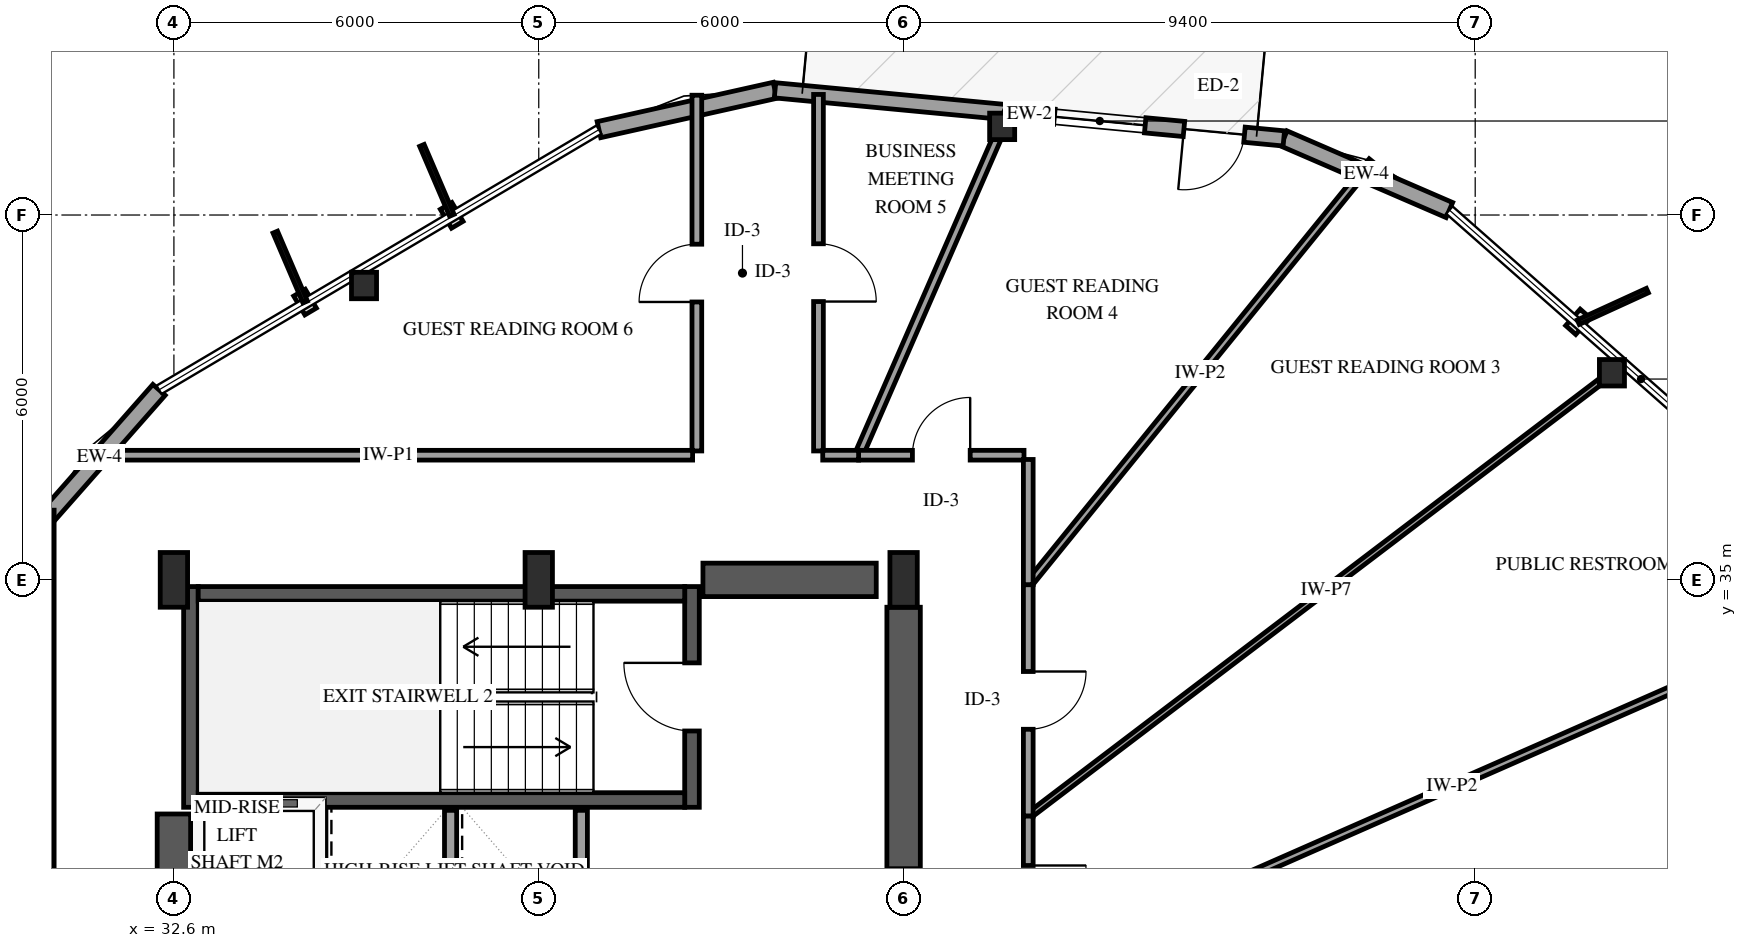
"""IFC4 building model, lengths in metres.
Left out: names, types, materials, properties, quantities, classifications, styles, units other than length and angle.
Written with IfcOpenShell. Run it as: python <this file> out.ifc"""

import sys

from ifc_helpers import new_model, si_unit, direction, frame, frame_2d, origin, origin_2d, place, context, subcontext, project, spatial, rectangle, i_section, extrude, element, fill, save


model = new_model("IFC4")
c1 = context("Model", 3, precision=1e-05, world=origin(), true_north=direction((0.0, 1.0)))
c2 = subcontext(c1, "Body", "Model", "MODEL_VIEW")
j1 = project(units=[si_unit("LENGTHUNIT", "METRE"), si_unit("PLANEANGLEUNIT", "RADIAN")], contexts=[c1])
p1 = place(None, origin())
s1 = spatial("IfcSite", under=j1, at=p1, CompositionType="ELEMENT")
p2 = place(p1, origin())
s2 = spatial("IfcBuilding", under=s1, at=p2, CompositionType="ELEMENT")
p3 = place(p2, frame((0.0, 0.0, 146.2)))
s3 = spatial("IfcBuildingStorey", under=s2, at=p3, CompositionType="ELEMENT", Elevation=146.2)
p4 = place(p3, frame((32.88, 31.26, 0.0), z_axis=(0.0, 0.0, 1.0), x_axis=(0.0, 1.0, 0.0)))
e1 = element("IfcWall", 1, at=p4, inside=s3, PredefinedType="SHEAR", context=c2, shape_type="SweptSolid", body=[
    extrude(rectangle(XDim=3.63, YDim=0.24, at=frame_2d((1.815, 0.0))), origin(), (0.0, 0.0, 1.0), 3.6),
])
p5 = place(p3, frame((41.12, 31.26, 0.0), z_axis=(0.0, 0.0, 1.0), x_axis=(0.0, 1.0, 0.0)))
e2 = element("IfcWall", 2, at=p5, inside=s3, PredefinedType="SHEAR", context=c2, shape_type="SweptSolid", body=[
    extrude(rectangle(XDim=3.63, YDim=0.24, at=frame_2d((1.815, 0.0))), origin(), (0.0, 0.0, 1.0), 3.6),
])
p6 = place(p5, frame((1.255, 0.0, 0.0)))
e3 = element("IfcOpeningElement", 3, at=p6, cuts=e2, PredefinedType="OPENING", context=c2, shape_type="SweptSolid", body=[
    extrude(rectangle(XDim=1.12, YDim=2.15, at=frame_2d((0.56, 1.075))), frame((0.0, 0.13, 0.0), z_axis=(0.0, -1.0, 0.0), x_axis=(1.0, 0.0, 0.0)), (0.0, 0.0, 1.0), 0.26),
])
for number, where, z_axis, x_axis in (
    (4, (33.0, 31.38, 0.0), (0.0, 0.0, 1.0), (1.0, 0.0, 0.0)),
    (5, (33.0, 34.77, 0.0), (0.0, 0.0, 1.0), (1.0, 0.0, 0.0)),
):
    element("IfcWall", number, at=place(p3, frame(where, z_axis=z_axis, x_axis=x_axis)), inside=s3, PredefinedType="SHEAR", context=c2, shape_type="SweptSolid", body=[
        extrude(rectangle(XDim=8.0, YDim=0.24, at=frame_2d((4.0, 0.0))), origin(), (0.0, 0.0, 1.0), 3.6),
    ])
p7 = place(p3, frame((32.6, 18.85, 0.0), z_axis=(0.0, 0.0, 1.0), x_axis=(0.0, 1.0, 0.0)))
e6 = element("IfcWall", 6, at=p7, inside=s3, PredefinedType="SHEAR", context=c2, shape_type="SweptSolid", body=[
    extrude(rectangle(XDim=12.3, YDim=0.55, at=frame_2d((6.15, 0.0))), origin(), (0.0, 0.0, 1.0), 3.6),
])
p8 = place(p3, frame((41.3, 35.0, 0.0), z_axis=(0.0, 0.0, 1.0), x_axis=(1.0, 0.0, 0.0)))
e7 = element("IfcWall", 7, at=p8, inside=s3, PredefinedType="SHEAR", context=c2, shape_type="SweptSolid", body=[
    extrude(rectangle(XDim=2.85, YDim=0.55, at=frame_2d((1.425, 0.0))), origin(), (0.0, 0.0, 1.0), 3.6),
])
p9 = place(p3, frame((44.6, 29.8, 0.0), z_axis=(0.0, 0.0, 1.0), x_axis=(0.0, 1.0, 0.0)))
e8 = element("IfcWall", 8, at=p9, inside=s3, PredefinedType="SHEAR", context=c2, shape_type="SweptSolid", body=[
    extrude(rectangle(XDim=4.75, YDim=0.55, at=frame_2d((2.375, 0.0))), origin(), (0.0, 0.0, 1.0), 3.6),
])
for number, where, z_axis, x_axis in (
    (9, (32.6, 35.0, 0.0), (0.0, 0.0, 1.0), (1.0, 0.0, 0.0)),
    (10, (38.6, 35.0, 0.0), (0.0, 0.0, 1.0), (1.0, 0.0, 0.0)),
    (11, (44.6, 35.0, 0.0), (0.0, 0.0, 1.0), (1.0, 0.0, 0.0)),
):
    element("IfcColumn", number, at=place(p3, frame(where, z_axis=z_axis, x_axis=x_axis)), inside=s3, PredefinedType="PILASTER", context=c2, shape_type="SweptSolid", body=[
        extrude(rectangle(XDim=0.45, YDim=0.9, at=origin_2d()), origin(), (0.0, 0.0, 1.0), 3.6),
    ])
for number, where, z_axis, x_axis in (
    (12, (56.249, 38.406, 0.0), (0.0, 0.0, 1.0), (1.0, 0.0, 0.0)),
    (13, (46.221, 42.458, 0.0), (0.0, 0.0, 1.0), (1.0, 0.0, 0.0)),
    (14, (35.726, 39.841, 0.0), (0.0, 0.0, 1.0), (1.0, 0.0, 0.0)),
):
    element("IfcColumn", number, at=place(p3, frame(where, z_axis=z_axis, x_axis=x_axis)), inside=s3, PredefinedType="COLUMN", context=c2, shape_type="SweptSolid", body=[
        extrude(i_section(OverallWidth=0.412, OverallDepth=0.435, WebThickness=0.036, FlangeThickness=0.057, FilletRadius=0.038, at=origin_2d()), origin(), (0.0, 0.0, 1.0), 3.6),
    ])
p10 = place(p3, frame((53.575, 41.082, 0.0), z_axis=(0.0, 0.0, 1.0), x_axis=(-0.917738684301, 0.397184726969, 0.0)))
e15 = element("IfcWall", 15, at=p10, inside=s3, PredefinedType="SOLIDWALL", context=c2, shape_type="SweptSolid", body=[
    extrude(rectangle(XDim=2.967, YDim=0.27, at=frame_2d((1.483, 0.0))), origin(), (0.0, 0.0, 1.0), 2.679),
])
p11 = place(p3, frame((42.485, 43.051, 0.0), z_axis=(0.0, 0.0, 1.0), x_axis=(-0.975913267769, -0.218158872827, 0.0)))
e16 = element("IfcWall", 16, at=p11, inside=s3, PredefinedType="SOLIDWALL", context=c2, shape_type="SweptSolid", body=[
    extrude(rectangle(XDim=2.967, YDim=0.27, at=frame_2d((1.483, 0.0))), origin(), (0.0, 0.0, 1.0), 2.679),
])
p12 = place(p3, frame((50.853, 42.26, 0.0), z_axis=(0.0, 0.0, 1.0), x_axis=(-0.995561547902, 0.094112721457, 0.0)))
e17 = element("IfcWall", 17, at=p12, inside=s3, PredefinedType="SOLIDWALL", context=c2, shape_type="SweptSolid", body=[
    extrude(rectangle(XDim=8.405, YDim=0.25, at=frame_2d((4.203, 0.0))), origin(), (0.0, 0.0, 1.0), 2.679),
])
p13 = place(p12, frame((0.65, 0.0, 0.0)))
e18 = element("IfcOpeningElement", 18, at=p13, cuts=e17, PredefinedType="OPENING", context=c2, shape_type="SweptSolid", body=[
    extrude(rectangle(XDim=1.0, YDim=2.15, at=frame_2d((0.5, 1.075))), frame((0.0, 0.135, 0.0), z_axis=(0.0, -1.0, 0.0), x_axis=(1.0, 0.0, 0.0)), (0.0, 0.0, 1.0), 0.27),
])
p14 = place(p12, frame((2.29, 0.0, 0.72)))
e19 = element("IfcOpeningElement", 19, at=p14, cuts=e17, PredefinedType="OPENING", context=c2, shape_type="SweptSolid", body=[
    extrude(rectangle(XDim=1.5, YDim=1.7, at=frame_2d((0.75, 0.85))), frame((0.0, 0.135, 0.0), z_axis=(0.0, -1.0, 0.0), x_axis=(1.0, 0.0, 0.0)), (0.0, 0.0, 1.0), 0.27),
])
p15 = place(p3, frame((32.355, 38.125, 0.0), z_axis=(0.0, 0.0, 1.0), x_axis=(-0.661354843955, -0.750073176681, 0.0)))
e20 = element("IfcWall", 20, at=p15, inside=s3, PredefinedType="SOLIDWALL", context=c2, shape_type="SweptSolid", body=[
    extrude(rectangle(XDim=2.967, YDim=0.27, at=frame_2d((1.483, 0.0))), origin(), (0.0, 0.0, 1.0), 2.679),
])
for number, where, z_axis, x_axis in (
    (21, (35.0, 29.11, 0.0), (0.0, 0.0, 1.0), (0.0, 1.0, 0.0)),
    (22, (37.15, 29.11, 0.0), (0.0, 0.0, 1.0), (0.0, 1.0, 0.0)),
    (23, (39.3, 29.11, 0.0), (0.0, 0.0, 1.0), (0.0, 1.0, 0.0)),
):
    element("IfcWall", number, at=place(p3, frame(where, z_axis=z_axis, x_axis=x_axis)), inside=s3, PredefinedType="SOLIDWALL", context=c2, shape_type="SweptSolid", body=[
        extrude(rectangle(XDim=2.1, YDim=0.2, at=frame_2d((1.05, 0.0))), origin(), (0.0, 0.0, 1.0), 3.3),
    ])
p16 = place(p3, frame((46.65, 28.541, 0.0), z_axis=(0.0, 0.0, 1.0), x_axis=(0.915386429194, 0.402576309844, 0.0)))
e24 = element("IfcWall", 24, at=p16, inside=s3, PredefinedType="PARTITIONING", context=c2, shape_type="SweptSolid", body=[
    extrude(rectangle(XDim=15.224, YDim=0.12, at=frame_2d((7.612, 0.0))), origin(), (0.0, 0.0, 1.0), 3.3),
])
p17 = place(p3, frame((30.55, 21.778, 0.0), z_axis=(0.0, 0.0, 1.0), x_axis=(0.0, 1.0, 0.0)))
e25 = element("IfcWall", 25, at=p17, inside=s3, PredefinedType="PARTITIONING", context=c2, shape_type="SweptSolid", body=[
    extrude(rectangle(XDim=14.368, YDim=0.16, at=frame_2d((7.184, 0.0))), origin(), (0.0, 0.0, 1.0), 3.3),
])
p18 = place(p17, frame((6.709, 0.0, 0.0)))
e26 = element("IfcOpeningElement", 26, at=p18, cuts=e25, PredefinedType="OPENING", context=c2, shape_type="SweptSolid", body=[
    extrude(rectangle(XDim=0.95, YDim=2.15, at=frame_2d((0.475, 1.075))), frame((0.0, 0.09, 0.0), z_axis=(0.0, -1.0, 0.0), x_axis=(1.0, 0.0, 0.0)), (0.0, 0.0, 1.0), 0.18),
])
p19 = place(p3, frame((46.65, 31.115, 0.0), z_axis=(0.0, 0.0, 1.0), x_axis=(0.796314037098, 0.604883422092, 0.0)))
e27 = element("IfcWall", 27, at=p19, inside=s3, PredefinedType="PARTITIONING", context=c2, shape_type="SweptSolid", body=[
    extrude(rectangle(XDim=12.298, YDim=0.1, at=frame_2d((6.149, 0.0))), origin(), (0.0, 0.0, 1.0), 3.3),
])
p20 = place(p3, frame((46.65, 34.921, 0.0), z_axis=(0.0, 0.0, 1.0), x_axis=(0.630132507275, 0.776487619524, 0.0)))
e28 = element("IfcWall", 28, at=p20, inside=s3, PredefinedType="PARTITIONING", context=c2, shape_type="SweptSolid", body=[
    extrude(rectangle(XDim=8.971, YDim=0.12, at=frame_2d((4.486, 0.0))), origin(), (0.0, 0.0, 1.0), 2.678),
])
p21 = place(p3, frame((43.86, 37.05, 0.0), z_axis=(0.0, 0.0, 1.0), x_axis=(0.400046288898, 0.916494935468, 0.0)))
e29 = element("IfcWall", 29, at=p21, inside=s3, PredefinedType="PARTITIONING", context=c2, shape_type="SweptSolid", body=[
    extrude(rectangle(XDim=6.152, YDim=0.14, at=frame_2d((3.076, 0.0))), origin(), (0.0, 0.0, 1.0), 2.595),
])
p22 = place(p3, frame((43.2, 42.983, 0.0), z_axis=(0.0, 0.0, 1.0), x_axis=(0.0, -1.0, 0.0)))
e30 = element("IfcWall", 30, at=p22, inside=s3, PredefinedType="PARTITIONING", context=c2, shape_type="SweptSolid", body=[
    extrude(rectangle(XDim=5.863, YDim=0.16, at=frame_2d((2.931, 0.0))), origin(), (0.0, 0.0, 1.0), 3.3),
])
p23 = place(p22, frame((2.456, 0.0, 0.0)))
e31 = element("IfcOpeningElement", 31, at=p23, cuts=e30, PredefinedType="OPENING", context=c2, shape_type="SweptSolid", body=[
    extrude(rectangle(XDim=0.95, YDim=2.15, at=frame_2d((0.475, 1.075))), frame((0.0, 0.09, 0.0), z_axis=(0.0, -1.0, 0.0), x_axis=(1.0, 0.0, 0.0)), (0.0, 0.0, 1.0), 0.18),
])
p24 = place(p3, frame((41.2, 37.12, 0.0), z_axis=(0.0, 0.0, 1.0), x_axis=(0.0, 1.0, 0.0)))
e32 = element("IfcWall", 32, at=p24, inside=s3, PredefinedType="PARTITIONING", context=c2, shape_type="SweptSolid", body=[
    extrude(rectangle(XDim=5.85, YDim=0.16, at=frame_2d((2.925, 0.0))), origin(), (0.0, 0.0, 1.0), 3.3),
])
p25 = place(p24, frame((2.45, 0.0, 0.0)))
e33 = element("IfcOpeningElement", 33, at=p25, cuts=e32, PredefinedType="OPENING", context=c2, shape_type="SweptSolid", body=[
    extrude(rectangle(XDim=0.95, YDim=2.15, at=frame_2d((0.475, 1.075))), frame((0.0, 0.09, 0.0), z_axis=(0.0, -1.0, 0.0), x_axis=(1.0, 0.0, 0.0)), (0.0, 0.0, 1.0), 0.18),
])
p26 = place(p3, frame((31.123, 37.05, 0.0), z_axis=(0.0, 0.0, 1.0), x_axis=(1.0, 0.0, 0.0)))
e34 = element("IfcWall", 34, at=p26, inside=s3, PredefinedType="PARTITIONING", context=c2, shape_type="SweptSolid", body=[
    extrude(rectangle(XDim=5.144, YDim=0.16, at=frame_2d((2.572, 0.0))), origin(), (0.0, 0.0, 1.0), 3.3),
])
p27 = place(p3, frame((36.268, 37.05, 0.0), z_axis=(0.0, 0.0, 1.0), x_axis=(1.0, 0.0, 0.0)))
e35 = element("IfcWall", 35, at=p27, inside=s3, PredefinedType="PARTITIONING", context=c2, shape_type="SweptSolid", body=[
    extrude(rectangle(XDim=4.862, YDim=0.16, at=frame_2d((2.431, 0.0))), origin(), (0.0, 0.0, 1.0), 3.3),
])
p28 = place(p3, frame((46.65, 34.921, 0.0), z_axis=(0.0, 0.0, 1.0), x_axis=(0.0, -1.0, 0.0)))
e36 = element("IfcWall", 36, at=p28, inside=s3, PredefinedType="PARTITIONING", context=c2, shape_type="SweptSolid", body=[
    extrude(rectangle(XDim=3.806, YDim=0.16, at=frame_2d((1.903, 0.0))), origin(), (0.0, 0.0, 1.0), 3.3),
])
p29 = place(p28, frame((1.428, 0.0, 0.0)))
e37 = element("IfcOpeningElement", 37, at=p29, cuts=e36, PredefinedType="OPENING", context=c2, shape_type="SweptSolid", body=[
    extrude(rectangle(XDim=0.95, YDim=2.15, at=frame_2d((0.475, 1.075))), frame((0.0, 0.09, 0.0), z_axis=(0.0, -1.0, 0.0), x_axis=(1.0, 0.0, 0.0)), (0.0, 0.0, 1.0), 0.18),
])
p30 = place(p3, frame((43.86, 37.05, 0.0), z_axis=(0.0, 0.0, 1.0), x_axis=(1.0, 0.0, 0.0)))
e38 = element("IfcWall", 38, at=p30, inside=s3, PredefinedType="PARTITIONING", context=c2, shape_type="SweptSolid", body=[
    extrude(rectangle(XDim=2.72, YDim=0.16, at=frame_2d((1.36, 0.0))), origin(), (0.0, 0.0, 1.0), 3.3),
])
p31 = place(p30, frame((0.885, 0.0, 0.0)))
e39 = element("IfcOpeningElement", 39, at=p31, cuts=e38, PredefinedType="OPENING", context=c2, shape_type="SweptSolid", body=[
    extrude(rectangle(XDim=0.95, YDim=2.15, at=frame_2d((0.475, 1.075))), frame((0.0, 0.09, 0.0), z_axis=(0.0, -1.0, 0.0), x_axis=(1.0, 0.0, 0.0)), (0.0, 0.0, 1.0), 0.18),
])
p32 = place(p3, frame((46.65, 31.115, 0.0), z_axis=(0.0, 0.0, 1.0), x_axis=(0.0, -1.0, 0.0)))
e40 = element("IfcWall", 40, at=p32, inside=s3, PredefinedType="PARTITIONING", context=c2, shape_type="SweptSolid", body=[
    extrude(rectangle(XDim=2.574, YDim=0.16, at=frame_2d((1.287, 0.0))), origin(), (0.0, 0.0, 1.0), 3.3),
])
p33 = place(p32, frame((0.812, 0.0, 0.0)))
e41 = element("IfcOpeningElement", 41, at=p33, cuts=e40, PredefinedType="OPENING", context=c2, shape_type="SweptSolid", body=[
    extrude(rectangle(XDim=0.95, YDim=2.15, at=frame_2d((0.475, 1.075))), frame((0.0, 0.09, 0.0), z_axis=(0.0, -1.0, 0.0), x_axis=(1.0, 0.0, 0.0)), (0.0, 0.0, 1.0), 0.18),
])
p34 = place(p3, frame((46.65, 36.98, 0.0), z_axis=(0.0, 0.0, 1.0), x_axis=(0.0, -1.0, 0.0)))
e42 = element("IfcWall", 42, at=p34, inside=s3, PredefinedType="PARTITIONING", context=c2, shape_type="SweptSolid", body=[
    extrude(rectangle(XDim=2.059, YDim=0.16, at=frame_2d((1.03, 0.0))), origin(), (0.0, 0.0, 1.0), 3.3),
])
p35 = place(p3, frame((43.27, 37.05, 0.0), z_axis=(0.0, 0.0, 1.0), x_axis=(1.0, 0.0, 0.0)))
e43 = element("IfcWall", 43, at=p35, inside=s3, PredefinedType="PARTITIONING", context=c2, shape_type="SweptSolid", body=[
    extrude(rectangle(XDim=0.59, YDim=0.16, at=frame_2d((0.295, 0.0))), origin(), (0.0, 0.0, 1.0), 3.3),
])
p36 = place(p13, origin())
e44 = element("IfcDoor", 44, at=p36, inside=s3, OperationType="SINGLE_SWING_RIGHT", PredefinedType="DOOR", context=c2, shape_type="SweptSolid", body=[
    extrude(rectangle(XDim=1.0, YDim=2.15, at=frame_2d((0.5, 1.075))), frame((0.0, 0.025, 0.0), z_axis=(0.0, -1.0, 0.0), x_axis=(1.0, 0.0, 0.0)), (0.0, 0.0, 1.0), 0.05),
])
fill(e18, e44)
p37 = place(p14, origin())
e45 = element("IfcWindow", 45, at=p37, inside=s3, PartitioningType="SINGLE_PANEL", PredefinedType="WINDOW", context=c2, shape_type="SweptSolid", body=[
    extrude(rectangle(XDim=1.5, YDim=1.7, at=frame_2d((0.75, 0.85))), frame((0.0, 0.03, 0.0), z_axis=(0.0, -1.0, 0.0), x_axis=(1.0, 0.0, 0.0)), (0.0, 0.0, 1.0), 0.06),
])
fill(e19, e45)
p38 = place(p6, origin())
e46 = element("IfcDoor", 46, at=p38, inside=s3, OperationType="SINGLE_SWING_RIGHT", PredefinedType="DOOR", context=c2, shape_type="SweptSolid", body=[
    extrude(rectangle(XDim=1.12, YDim=2.15, at=frame_2d((0.56, 1.075))), frame((0.0, 0.025, 0.0), z_axis=(0.0, -1.0, 0.0), x_axis=(1.0, 0.0, 0.0)), (0.0, 0.0, 1.0), 0.05),
])
fill(e3, e46)
p39 = place(p23, origin())
e47 = element("IfcDoor", 47, at=p39, inside=s3, OperationType="SINGLE_SWING_RIGHT", PredefinedType="DOOR", context=c2, shape_type="SweptSolid", body=[
    extrude(rectangle(XDim=0.95, YDim=2.15, at=frame_2d((0.475, 1.075))), frame((0.0, 0.025, 0.0), z_axis=(0.0, -1.0, 0.0), x_axis=(1.0, 0.0, 0.0)), (0.0, 0.0, 1.0), 0.05),
])
fill(e31, e47)
p40 = place(p25, origin())
e48 = element("IfcDoor", 48, at=p40, inside=s3, OperationType="SINGLE_SWING_LEFT", PredefinedType="DOOR", context=c2, shape_type="SweptSolid", body=[
    extrude(rectangle(XDim=0.95, YDim=2.15, at=frame_2d((0.475, 1.075))), frame((0.0, 0.025, 0.0), z_axis=(0.0, -1.0, 0.0), x_axis=(1.0, 0.0, 0.0)), (0.0, 0.0, 1.0), 0.05),
])
fill(e33, e48)
p41 = place(p29, origin())
e49 = element("IfcDoor", 49, at=p41, inside=s3, OperationType="SINGLE_SWING_LEFT", PredefinedType="DOOR", context=c2, shape_type="SweptSolid", body=[
    extrude(rectangle(XDim=0.95, YDim=2.15, at=frame_2d((0.475, 1.075))), frame((0.0, 0.025, 0.0), z_axis=(0.0, -1.0, 0.0), x_axis=(1.0, 0.0, 0.0)), (0.0, 0.0, 1.0), 0.05),
])
fill(e37, e49)
p42 = place(p31, origin())
e50 = element("IfcDoor", 50, at=p42, inside=s3, OperationType="SINGLE_SWING_RIGHT", PredefinedType="DOOR", context=c2, shape_type="SweptSolid", body=[
    extrude(rectangle(XDim=0.95, YDim=2.15, at=frame_2d((0.475, 1.075))), frame((0.0, 0.025, 0.0), z_axis=(0.0, -1.0, 0.0), x_axis=(1.0, 0.0, 0.0)), (0.0, 0.0, 1.0), 0.05),
])
fill(e39, e50)
p43 = place(p33, origin())
e51 = element("IfcDoor", 51, at=p43, inside=s3, OperationType="SINGLE_SWING_LEFT", PredefinedType="DOOR", context=c2, shape_type="SweptSolid", body=[
    extrude(rectangle(XDim=0.95, YDim=2.15, at=frame_2d((0.475, 1.075))), frame((0.0, 0.025, 0.0), z_axis=(0.0, -1.0, 0.0), x_axis=(1.0, 0.0, 0.0)), (0.0, 0.0, 1.0), 0.05),
])
fill(e41, e51)
save(model, sys.argv[1])
